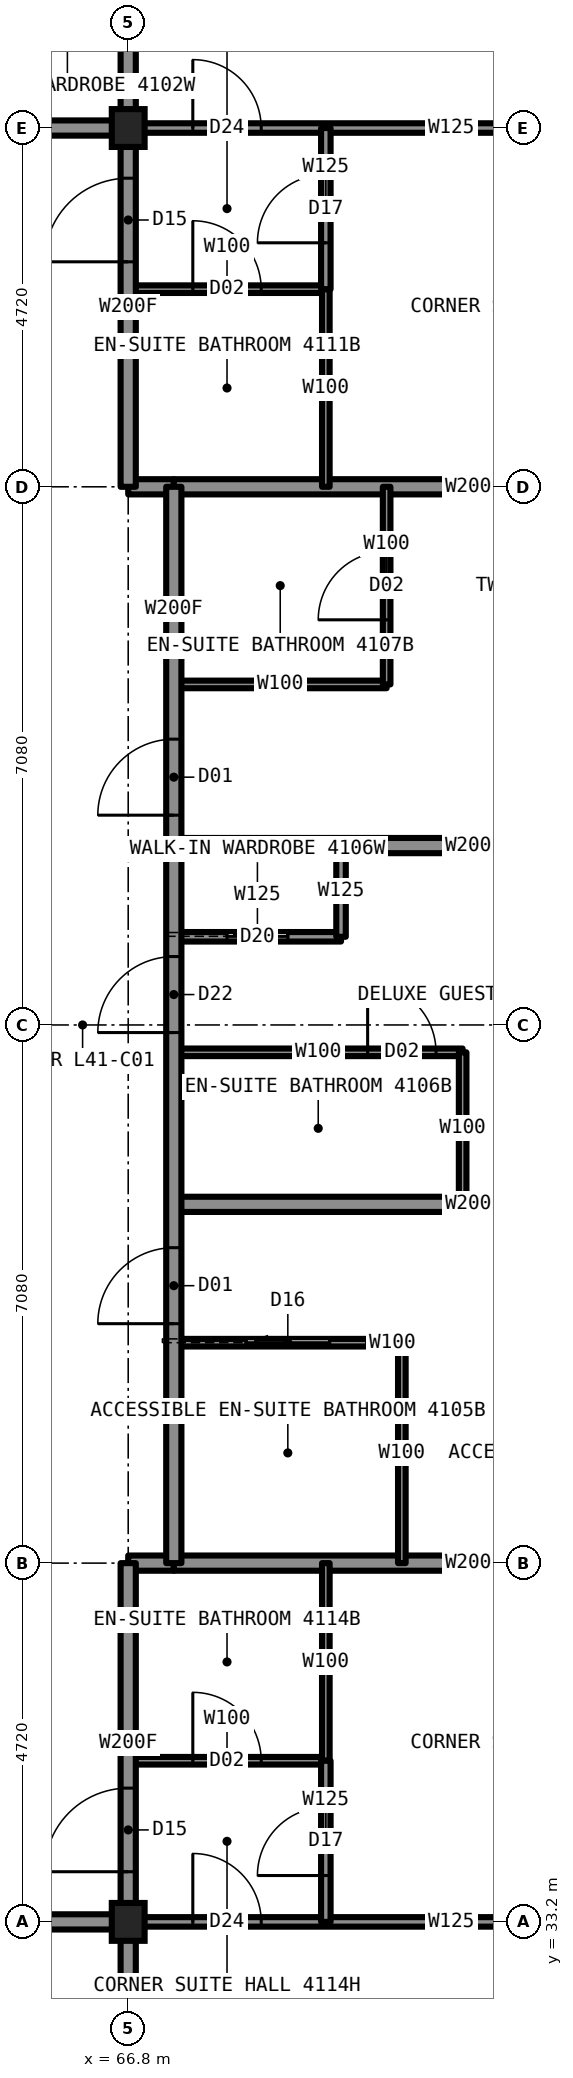
"""IFC4 building model, lengths in metres.
Left out: names, types, materials, properties, quantities, classifications, styles, units other than length and angle.
Written with IfcOpenShell. Run it as: python <this file> out.ifc"""

import sys

from ifc_helpers import new_model, si_unit, direction, frame, frame_2d, origin, origin_2d, place, context, subcontext, project, spatial, rectangle, i_section, extrude, element, fill, save


model = new_model("IFC4")
c1 = context("Model", 3, precision=1e-05, world=origin(), true_north=direction((0.0, 1.0)))
c2 = subcontext(c1, "Body", "Model", "MODEL_VIEW")
j1 = project(units=[si_unit("LENGTHUNIT", "METRE"), si_unit("PLANEANGLEUNIT", "RADIAN")], contexts=[c1])
p1 = place(None, origin())
s1 = spatial("IfcSite", under=j1, at=p1, CompositionType="ELEMENT")
p2 = place(p1, origin())
s2 = spatial("IfcBuilding", under=s1, at=p2, CompositionType="ELEMENT")
p3 = place(p2, frame((0.0, 0.0, 145.9)))
s3 = spatial("IfcBuildingStorey", under=s2, at=p3, CompositionType="ELEMENT", Elevation=145.9)
for number, where, z_axis, x_axis in (
    (1, (66.8, 33.2, 0.0), (0.0, 0.0, 1.0), (1.0, 0.0, 0.0)),
    (2, (66.8, 56.8, 0.0), (0.0, 0.0, 1.0), (1.0, 0.0, 0.0)),
):
    element("IfcColumn", number, at=place(p3, frame(where, z_axis=z_axis, x_axis=x_axis)), inside=s3, PredefinedType="COLUMN", context=c2, shape_type="SweptSolid", body=[
        extrude(i_section(OverallWidth=0.432, OverallDepth=0.498, WebThickness=0.056, FlangeThickness=0.089, at=origin_2d()), origin(), (0.0, 0.0, 1.0), 3.5),
    ])
p4 = place(p3, frame((66.8, 44.64, 0.0), z_axis=(0.0, 0.0, 1.0), x_axis=(1.0, 0.0, 0.0)))
e3 = element("IfcWall", 3, at=p4, inside=s3, PredefinedType="PARTITIONING", context=c2, shape_type="SweptSolid", body=[
    extrude(rectangle(XDim=3.8, YDim=0.1, at=frame_2d((1.9, 0.0))), origin(), (0.0, 0.0, 1.0), 3.33),
])
p5 = place(p4, frame((2.55, 0.0, 0.0)))
e4 = element("IfcOpeningElement", 4, at=p5, cuts=e3, PredefinedType="OPENING", context=c2, shape_type="SweptSolid", body=[
    extrude(rectangle(XDim=0.9, YDim=2.1, at=frame_2d((0.45, 1.05))), frame((0.0, 0.06, 0.0), z_axis=(0.0, -1.0, 0.0), x_axis=(1.0, 0.0, 0.0)), (0.0, 0.0, 1.0), 0.12),
])
p6 = place(p3, frame((43.2, 33.2, 0.0), z_axis=(0.0, 0.0, 1.0), x_axis=(1.0, 0.0, 0.0)))
e5 = element("IfcWall", 5, at=p6, inside=s3, PredefinedType="PARTITIONING", context=c2, shape_type="SweptSolid", body=[
    extrude(rectangle(XDim=23.6, YDim=0.2, at=frame_2d((11.8, 0.0))), origin(), (0.0, 0.0, 1.0), 3.33),
])
p7 = place(p6, frame((1.85, 0.0, 0.0)))
e6 = element("IfcOpeningElement", 6, at=p7, cuts=e5, PredefinedType="OPENING", context=c2, shape_type="SweptSolid", body=[
    extrude(rectangle(XDim=1.1, YDim=2.2, at=frame_2d((0.55, 1.1))), frame((0.0, 0.11, 0.0), z_axis=(0.0, -1.0, 0.0), x_axis=(1.0, 0.0, 0.0)), (0.0, 0.0, 1.0), 0.22),
])
p8 = place(p6, frame((17.16, 0.0, 0.0)))
e7 = element("IfcOpeningElement", 7, at=p8, cuts=e5, PredefinedType="OPENING", context=c2, shape_type="SweptSolid", body=[
    extrude(rectangle(XDim=1.0, YDim=2.2, at=frame_2d((0.5, 1.1))), frame((0.0, 0.11, 0.0), z_axis=(0.0, -1.0, 0.0), x_axis=(1.0, 0.0, 0.0)), (0.0, 0.0, 1.0), 0.22),
])
p9 = place(p3, frame((66.8, 33.2, 0.0), z_axis=(0.0, 0.0, 1.0), x_axis=(1.0, 0.0, 0.0)))
e8 = element("IfcWall", 8, at=p9, inside=s3, PredefinedType="PARTITIONING", context=c2, shape_type="SweptSolid", body=[
    extrude(rectangle(XDim=8.5, YDim=0.125, at=frame_2d((4.25, 0.0))), origin(), (0.0, 0.0, 1.0), 2.573),
])
p10 = place(p9, frame((0.85, 0.0, 0.0)))
e9 = element("IfcOpeningElement", 9, at=p10, cuts=e8, PredefinedType="OPENING", context=c2, shape_type="SweptSolid", body=[
    extrude(rectangle(XDim=0.9, YDim=2.2, at=frame_2d((0.45, 1.1))), frame((0.0, 0.073, 0.0), z_axis=(0.0, -1.0, 0.0), x_axis=(1.0, 0.0, 0.0)), (0.0, 0.0, 1.0), 0.145),
])
p11 = place(p3, frame((66.8, 42.64, 0.0), z_axis=(0.0, 0.0, 1.0), x_axis=(1.0, 0.0, 0.0)))
e10 = element("IfcWall", 10, at=p11, inside=s3, PredefinedType="PARTITIONING", context=c2, shape_type="SweptSolid", body=[
    extrude(rectangle(XDim=8.5, YDim=0.2, at=frame_2d((4.25, 0.0))), origin(), (0.0, 0.0, 1.0), 2.731),
])
p12 = place(p3, frame((66.8, 40.82, 0.0), z_axis=(0.0, 0.0, 1.0), x_axis=(1.0, 0.0, 0.0)))
e11 = element("IfcWall", 11, at=p12, inside=s3, PredefinedType="PARTITIONING", context=c2, shape_type="SweptSolid", body=[
    extrude(rectangle(XDim=3.0, YDim=0.1, at=frame_2d((1.5, 0.0))), origin(), (0.0, 0.0, 1.0), 3.33),
])
p13 = place(p12, frame((0.95, 0.0, 0.0)))
e12 = element("IfcOpeningElement", 12, at=p13, cuts=e11, PredefinedType="OPENING", context=c2, shape_type="SweptSolid", body=[
    extrude(rectangle(XDim=1.1, YDim=2.1, at=frame_2d((0.55, 1.05))), frame((0.0, 0.06, 0.0), z_axis=(0.0, -1.0, 0.0), x_axis=(1.0, 0.0, 0.0)), (0.0, 0.0, 1.0), 0.12),
])
p14 = place(p3, frame((66.8, 37.92, 0.0), z_axis=(0.0, 0.0, 1.0), x_axis=(1.0, 0.0, 0.0)))
e13 = element("IfcWall", 13, at=p14, inside=s3, PredefinedType="PARTITIONING", context=c2, shape_type="SweptSolid", body=[
    extrude(rectangle(XDim=8.5, YDim=0.2, at=frame_2d((4.25, 0.0))), origin(), (0.0, 0.0, 1.0), 2.573),
])
p15 = place(p3, frame((66.8, 35.32, 0.0), z_axis=(0.0, 0.0, 1.0), x_axis=(1.0, 0.0, 0.0)))
e14 = element("IfcWall", 14, at=p15, inside=s3, PredefinedType="PARTITIONING", context=c2, shape_type="SweptSolid", body=[
    extrude(rectangle(XDim=2.6, YDim=0.1, at=frame_2d((1.3, 0.0))), origin(), (0.0, 0.0, 1.0), 3.33),
])
p16 = place(p15, frame((0.85, 0.0, 0.0)))
e15 = element("IfcOpeningElement", 15, at=p16, cuts=e14, PredefinedType="OPENING", context=c2, shape_type="SweptSolid", body=[
    extrude(rectangle(XDim=0.9, YDim=2.1, at=frame_2d((0.45, 1.05))), frame((0.0, 0.06, 0.0), z_axis=(0.0, -1.0, 0.0), x_axis=(1.0, 0.0, 0.0)), (0.0, 0.0, 1.0), 0.12),
])
p17 = place(p3, frame((66.8, 46.16, 0.0), z_axis=(0.0, 0.0, 1.0), x_axis=(1.0, 0.0, 0.0)))
e16 = element("IfcWall", 16, at=p17, inside=s3, PredefinedType="PARTITIONING", context=c2, shape_type="SweptSolid", body=[
    extrude(rectangle(XDim=2.2, YDim=0.125, at=frame_2d((1.1, 0.0))), origin(), (0.0, 0.0, 1.0), 3.33),
])
p18 = place(p17, frame((0.7, 0.0, 0.0)))
e17 = element("IfcOpeningElement", 17, at=p18, cuts=e16, PredefinedType="OPENING", context=c2, shape_type="SweptSolid", body=[
    extrude(rectangle(XDim=0.8, YDim=2.1, at=frame_2d((0.4, 1.05))), frame((0.0, 0.073, 0.0), z_axis=(0.0, -1.0, 0.0), x_axis=(1.0, 0.0, 0.0)), (0.0, 0.0, 1.0), 0.145),
])
p19 = place(p3, frame((43.2, 56.8, 0.0), z_axis=(0.0, 0.0, 1.0), x_axis=(1.0, 0.0, 0.0)))
e18 = element("IfcWall", 18, at=p19, inside=s3, PredefinedType="PARTITIONING", context=c2, shape_type="SweptSolid", body=[
    extrude(rectangle(XDim=23.6, YDim=0.2, at=frame_2d((11.8, 0.0))), origin(), (0.0, 0.0, 1.0), 3.33),
])
p20 = place(p19, frame((1.85, 0.0, 0.0)))
e19 = element("IfcOpeningElement", 19, at=p20, cuts=e18, PredefinedType="OPENING", context=c2, shape_type="SweptSolid", body=[
    extrude(rectangle(XDim=1.1, YDim=2.2, at=frame_2d((0.55, 1.1))), frame((0.0, 0.11, 0.0), z_axis=(0.0, -1.0, 0.0), x_axis=(1.0, 0.0, 0.0)), (0.0, 0.0, 1.0), 0.22),
])
p21 = place(p19, frame((17.16, 0.0, 0.0)))
e20 = element("IfcOpeningElement", 20, at=p21, cuts=e18, PredefinedType="OPENING", context=c2, shape_type="SweptSolid", body=[
    extrude(rectangle(XDim=1.0, YDim=2.2, at=frame_2d((0.5, 1.1))), frame((0.0, 0.11, 0.0), z_axis=(0.0, -1.0, 0.0), x_axis=(1.0, 0.0, 0.0)), (0.0, 0.0, 1.0), 0.22),
])
p22 = place(p3, frame((66.8, 56.8, 0.0), z_axis=(0.0, 0.0, 1.0), x_axis=(1.0, 0.0, 0.0)))
e21 = element("IfcWall", 21, at=p22, inside=s3, PredefinedType="PARTITIONING", context=c2, shape_type="SweptSolid", body=[
    extrude(rectangle(XDim=8.5, YDim=0.125, at=frame_2d((4.25, 0.0))), origin(), (0.0, 0.0, 1.0), 2.573),
])
p23 = place(p22, frame((0.85, 0.0, 0.0)))
e22 = element("IfcOpeningElement", 22, at=p23, cuts=e21, PredefinedType="OPENING", context=c2, shape_type="SweptSolid", body=[
    extrude(rectangle(XDim=0.9, YDim=2.2, at=frame_2d((0.45, 1.1))), frame((0.0, 0.073, 0.0), z_axis=(0.0, -1.0, 0.0), x_axis=(1.0, 0.0, 0.0)), (0.0, 0.0, 1.0), 0.145),
])
p24 = place(p3, frame((66.8, 47.36, 0.0), z_axis=(0.0, 0.0, 1.0), x_axis=(1.0, 0.0, 0.0)))
e23 = element("IfcWall", 23, at=p24, inside=s3, PredefinedType="PARTITIONING", context=c2, shape_type="SweptSolid", body=[
    extrude(rectangle(XDim=8.5, YDim=0.2, at=frame_2d((4.25, 0.0))), origin(), (0.0, 0.0, 1.0), 2.731),
])
p25 = place(p3, frame((66.8, 49.48, 0.0), z_axis=(0.0, 0.0, 1.0), x_axis=(1.0, 0.0, 0.0)))
e24 = element("IfcWall", 24, at=p25, inside=s3, PredefinedType="PARTITIONING", context=c2, shape_type="SweptSolid", body=[
    extrude(rectangle(XDim=2.8, YDim=0.1, at=frame_2d((1.4, 0.0))), origin(), (0.0, 0.0, 1.0), 3.33),
])
p26 = place(p3, frame((66.8, 52.08, 0.0), z_axis=(0.0, 0.0, 1.0), x_axis=(1.0, 0.0, 0.0)))
e25 = element("IfcWall", 25, at=p26, inside=s3, PredefinedType="PARTITIONING", context=c2, shape_type="SweptSolid", body=[
    extrude(rectangle(XDim=2.6, YDim=0.2, at=frame_2d((1.3, 0.0))), origin(), (0.0, 0.0, 1.0), 2.573),
])
p27 = place(p3, frame((69.6, 52.08, 0.0), z_axis=(0.0, 0.0, 1.0), x_axis=(1.0, 0.0, 0.0)))
e26 = element("IfcWall", 26, at=p27, inside=s3, PredefinedType="PARTITIONING", context=c2, shape_type="SweptSolid", body=[
    extrude(rectangle(XDim=5.7, YDim=0.2, at=frame_2d((2.85, 0.0))), origin(), (0.0, 0.0, 1.0), 2.573),
])
p28 = place(p3, frame((66.8, 54.68, 0.0), z_axis=(0.0, 0.0, 1.0), x_axis=(1.0, 0.0, 0.0)))
e27 = element("IfcWall", 27, at=p28, inside=s3, PredefinedType="PARTITIONING", context=c2, shape_type="SweptSolid", body=[
    extrude(rectangle(XDim=2.6, YDim=0.1, at=frame_2d((1.3, 0.0))), origin(), (0.0, 0.0, 1.0), 3.33),
])
p29 = place(p28, frame((0.85, 0.0, 0.0)))
e28 = element("IfcOpeningElement", 28, at=p29, cuts=e27, PredefinedType="OPENING", context=c2, shape_type="SweptSolid", body=[
    extrude(rectangle(XDim=0.9, YDim=2.1, at=frame_2d((0.45, 1.05))), frame((0.0, 0.06, 0.0), z_axis=(0.0, -1.0, 0.0), x_axis=(1.0, 0.0, 0.0)), (0.0, 0.0, 1.0), 0.12),
])
p30 = place(p3, frame((66.8, 33.2, 0.0), z_axis=(0.0, 0.0, 1.0), x_axis=(0.0, 1.0, 0.0)))
e29 = element("IfcWall", 29, at=p30, inside=s3, PredefinedType="PARTITIONING", context=c2, shape_type="SweptSolid", body=[
    extrude(rectangle(XDim=23.6, YDim=0.2, at=frame_2d((11.8, 0.0))), origin(), (0.0, 0.0, 1.0), 3.33),
])
p31 = place(p30, frame((7.87, 0.0, 0.0)))
e30 = element("IfcOpeningElement", 30, at=p31, cuts=e29, PredefinedType="OPENING", context=c2, shape_type="SweptSolid", body=[
    extrude(rectangle(XDim=1.0, YDim=2.2, at=frame_2d((0.5, 1.1))), frame((0.0, 0.11, 0.0), z_axis=(0.0, -1.0, 0.0), x_axis=(1.0, 0.0, 0.0)), (0.0, 0.0, 1.0), 0.22),
])
p32 = place(p30, frame((11.7, 0.0, 0.0)))
e31 = element("IfcOpeningElement", 31, at=p32, cuts=e29, PredefinedType="OPENING", context=c2, shape_type="SweptSolid", body=[
    extrude(rectangle(XDim=1.0, YDim=2.2, at=frame_2d((0.5, 1.1))), frame((0.0, 0.11, 0.0), z_axis=(0.0, -1.0, 0.0), x_axis=(1.0, 0.0, 0.0)), (0.0, 0.0, 1.0), 0.22),
])
p33 = place(p30, frame((14.56, 0.0, 0.0)))
e32 = element("IfcOpeningElement", 32, at=p33, cuts=e29, PredefinedType="OPENING", context=c2, shape_type="SweptSolid", body=[
    extrude(rectangle(XDim=1.0, YDim=2.2, at=frame_2d((0.5, 1.1))), frame((0.0, 0.11, 0.0), z_axis=(0.0, -1.0, 0.0), x_axis=(1.0, 0.0, 0.0)), (0.0, 0.0, 1.0), 0.22),
])
p34 = place(p30, frame((21.84, 0.0, 0.0)))
e33 = element("IfcOpeningElement", 33, at=p34, cuts=e29, PredefinedType="OPENING", context=c2, shape_type="SweptSolid", body=[
    extrude(rectangle(XDim=1.1, YDim=2.2, at=frame_2d((0.55, 1.1))), frame((0.0, 0.11, 0.0), z_axis=(0.0, -1.0, 0.0), x_axis=(1.0, 0.0, 0.0)), (0.0, 0.0, 1.0), 0.22),
])
p35 = place(p30, frame((0.66, 0.0, 0.0)))
e34 = element("IfcOpeningElement", 34, at=p35, cuts=e29, PredefinedType="OPENING", context=c2, shape_type="SweptSolid", body=[
    extrude(rectangle(XDim=1.1, YDim=2.2, at=frame_2d((0.55, 1.1))), frame((0.0, 0.11, 0.0), z_axis=(0.0, -1.0, 0.0), x_axis=(1.0, 0.0, 0.0)), (0.0, 0.0, 1.0), 0.22),
])
for number, where, z_axis, x_axis in (
    (35, (66.8, 24.7, 0.0), (0.0, 0.0, 1.0), (0.0, 1.0, 0.0)),
    (36, (66.8, 56.8, 0.0), (0.0, 0.0, 1.0), (0.0, 1.0, 0.0)),
):
    element("IfcWall", number, at=place(p3, frame(where, z_axis=z_axis, x_axis=x_axis)), inside=s3, PredefinedType="PARTITIONING", context=c2, shape_type="SweptSolid", body=[
        extrude(rectangle(XDim=8.5, YDim=0.2, at=frame_2d((4.25, 0.0))), origin(), (0.0, 0.0, 1.0), 2.573),
    ])
p36 = place(p3, frame((69.0, 46.16, 0.0), z_axis=(0.0, 0.0, 1.0), x_axis=(0.0, 1.0, 0.0)))
e37 = element("IfcWall", 37, at=p36, inside=s3, PredefinedType="PARTITIONING", context=c2, shape_type="SweptSolid", body=[
    extrude(rectangle(XDim=1.2, YDim=0.125, at=frame_2d((0.6, 0.0))), origin(), (0.0, 0.0, 1.0), 3.33),
])
for number, where, z_axis, x_axis in (
    (38, (69.4, 35.32, 0.0), (0.0, 0.0, 1.0), (0.0, 1.0, 0.0)),
    (39, (69.4, 52.08, 0.0), (0.0, 0.0, 1.0), (0.0, 1.0, 0.0)),
):
    element("IfcWall", number, at=place(p3, frame(where, z_axis=z_axis, x_axis=x_axis)), inside=s3, PredefinedType="PARTITIONING", context=c2, shape_type="SweptSolid", body=[
        extrude(rectangle(XDim=2.6, YDim=0.1, at=frame_2d((1.3, 0.0))), origin(), (0.0, 0.0, 1.0), 3.33),
    ])
p37 = place(p3, frame((69.4, 33.2, 0.0), z_axis=(0.0, 0.0, 1.0), x_axis=(0.0, 1.0, 0.0)))
e40 = element("IfcWall", 40, at=p37, inside=s3, PredefinedType="PARTITIONING", context=c2, shape_type="SweptSolid", body=[
    extrude(rectangle(XDim=2.12, YDim=0.125, at=frame_2d((1.06, 0.0))), origin(), (0.0, 0.0, 1.0), 3.33),
])
p38 = place(p37, frame((0.61, 0.0, 0.0)))
e41 = element("IfcOpeningElement", 41, at=p38, cuts=e40, PredefinedType="OPENING", context=c2, shape_type="SweptSolid", body=[
    extrude(rectangle(XDim=0.9, YDim=2.2, at=frame_2d((0.45, 1.1))), frame((0.0, 0.073, 0.0), z_axis=(0.0, -1.0, 0.0), x_axis=(1.0, 0.0, 0.0)), (0.0, 0.0, 1.0), 0.145),
])
p39 = place(p3, frame((69.4, 54.68, 0.0), z_axis=(0.0, 0.0, 1.0), x_axis=(0.0, 1.0, 0.0)))
e42 = element("IfcWall", 42, at=p39, inside=s3, PredefinedType="PARTITIONING", context=c2, shape_type="SweptSolid", body=[
    extrude(rectangle(XDim=2.12, YDim=0.125, at=frame_2d((1.06, 0.0))), origin(), (0.0, 0.0, 1.0), 3.33),
])
p40 = place(p39, frame((0.61, 0.0, 0.0)))
e43 = element("IfcOpeningElement", 43, at=p40, cuts=e42, PredefinedType="OPENING", context=c2, shape_type="SweptSolid", body=[
    extrude(rectangle(XDim=0.9, YDim=2.2, at=frame_2d((0.45, 1.1))), frame((0.0, 0.073, 0.0), z_axis=(0.0, -1.0, 0.0), x_axis=(1.0, 0.0, 0.0)), (0.0, 0.0, 1.0), 0.145),
])
p41 = place(p3, frame((69.6, 49.48, 0.0), z_axis=(0.0, 0.0, 1.0), x_axis=(0.0, 1.0, 0.0)))
e44 = element("IfcWall", 44, at=p41, inside=s3, PredefinedType="PARTITIONING", context=c2, shape_type="SweptSolid", body=[
    extrude(rectangle(XDim=2.6, YDim=0.1, at=frame_2d((1.3, 0.0))), origin(), (0.0, 0.0, 1.0), 3.33),
])
p42 = place(p41, frame((0.85, 0.0, 0.0)))
e45 = element("IfcOpeningElement", 45, at=p42, cuts=e44, PredefinedType="OPENING", context=c2, shape_type="SweptSolid", body=[
    extrude(rectangle(XDim=0.9, YDim=2.1, at=frame_2d((0.45, 1.05))), frame((0.0, 0.06, 0.0), z_axis=(0.0, -1.0, 0.0), x_axis=(1.0, 0.0, 0.0)), (0.0, 0.0, 1.0), 0.12),
])
p43 = place(p3, frame((69.8, 37.92, 0.0), z_axis=(0.0, 0.0, 1.0), x_axis=(0.0, 1.0, 0.0)))
e46 = element("IfcWall", 46, at=p43, inside=s3, PredefinedType="PARTITIONING", context=c2, shape_type="SweptSolid", body=[
    extrude(rectangle(XDim=2.9, YDim=0.1, at=frame_2d((1.45, 0.0))), origin(), (0.0, 0.0, 1.0), 3.33),
])
p44 = place(p3, frame((70.6, 42.64, 0.0), z_axis=(0.0, 0.0, 1.0), x_axis=(0.0, 1.0, 0.0)))
e47 = element("IfcWall", 47, at=p44, inside=s3, PredefinedType="PARTITIONING", context=c2, shape_type="SweptSolid", body=[
    extrude(rectangle(XDim=2.0, YDim=0.1, at=frame_2d((1.0, 0.0))), origin(), (0.0, 0.0, 1.0), 3.33),
])
p45 = place(p31, origin())
e48 = element("IfcDoor", 48, at=p45, inside=s3, OperationType="SINGLE_SWING_LEFT", PredefinedType="DOOR", context=c2, shape_type="SweptSolid", body=[
    extrude(rectangle(XDim=1.0, YDim=2.2, at=frame_2d((0.5, 1.1))), frame((0.0, 0.025, 0.0), z_axis=(0.0, -1.0, 0.0), x_axis=(1.0, 0.0, 0.0)), (0.0, 0.0, 1.0), 0.05),
])
fill(e30, e48)
p46 = place(p13, origin())
e49 = element("IfcDoor", 49, at=p46, inside=s3, OperationType="SLIDING_TO_LEFT", PredefinedType="DOOR", context=c2, shape_type="SweptSolid", body=[
    extrude(rectangle(XDim=1.1, YDim=2.1, at=frame_2d((0.55, 1.05))), frame((0.0, 0.025, 0.0), z_axis=(0.0, -1.0, 0.0), x_axis=(1.0, 0.0, 0.0)), (0.0, 0.0, 1.0), 0.05),
])
fill(e12, e49)
p47 = place(p32, origin())
e50 = element("IfcDoor", 50, at=p47, inside=s3, OperationType="SINGLE_SWING_LEFT", PredefinedType="DOOR", context=c2, shape_type="SweptSolid", body=[
    extrude(rectangle(XDim=1.0, YDim=2.2, at=frame_2d((0.5, 1.1))), frame((0.0, 0.025, 0.0), z_axis=(0.0, -1.0, 0.0), x_axis=(1.0, 0.0, 0.0)), (0.0, 0.0, 1.0), 0.05),
])
fill(e31, e50)
p48 = place(p5, origin())
e51 = element("IfcDoor", 51, at=p48, inside=s3, OperationType="SINGLE_SWING_RIGHT", PredefinedType="DOOR", context=c2, shape_type="SweptSolid", body=[
    extrude(rectangle(XDim=0.9, YDim=2.1, at=frame_2d((0.45, 1.05))), frame((0.0, 0.025, 0.0), z_axis=(0.0, -1.0, 0.0), x_axis=(1.0, 0.0, 0.0)), (0.0, 0.0, 1.0), 0.05),
])
fill(e4, e51)
p49 = place(p18, origin())
e52 = element("IfcDoor", 52, at=p49, inside=s3, OperationType="SLIDING_TO_LEFT", PredefinedType="DOOR", context=c2, shape_type="SweptSolid", body=[
    extrude(rectangle(XDim=0.8, YDim=2.1, at=frame_2d((0.4, 1.05))), frame((0.0, 0.025, 0.0), z_axis=(0.0, -1.0, 0.0), x_axis=(1.0, 0.0, 0.0)), (0.0, 0.0, 1.0), 0.05),
])
fill(e17, e52)
p50 = place(p33, origin())
e53 = element("IfcDoor", 53, at=p50, inside=s3, OperationType="SINGLE_SWING_LEFT", PredefinedType="DOOR", context=c2, shape_type="SweptSolid", body=[
    extrude(rectangle(XDim=1.0, YDim=2.2, at=frame_2d((0.5, 1.1))), frame((0.0, 0.025, 0.0), z_axis=(0.0, -1.0, 0.0), x_axis=(1.0, 0.0, 0.0)), (0.0, 0.0, 1.0), 0.05),
])
fill(e32, e53)
p51 = place(p42, origin())
e54 = element("IfcDoor", 54, at=p51, inside=s3, OperationType="SINGLE_SWING_RIGHT", PredefinedType="DOOR", context=c2, shape_type="SweptSolid", body=[
    extrude(rectangle(XDim=0.9, YDim=2.1, at=frame_2d((0.45, 1.05))), frame((0.0, 0.025, 0.0), z_axis=(0.0, -1.0, 0.0), x_axis=(1.0, 0.0, 0.0)), (0.0, 0.0, 1.0), 0.05),
])
fill(e45, e54)
p52 = place(p23, origin())
e55 = element("IfcDoor", 55, at=p52, inside=s3, OperationType="SINGLE_SWING_LEFT", PredefinedType="DOOR", context=c2, shape_type="SweptSolid", body=[
    extrude(rectangle(XDim=0.9, YDim=2.2, at=frame_2d((0.45, 1.1))), frame((0.0, 0.025, 0.0), z_axis=(0.0, -1.0, 0.0), x_axis=(1.0, 0.0, 0.0)), (0.0, 0.0, 1.0), 0.05),
])
fill(e22, e55)
p53 = place(p29, origin())
e56 = element("IfcDoor", 56, at=p53, inside=s3, OperationType="SINGLE_SWING_RIGHT", PredefinedType="DOOR", context=c2, shape_type="SweptSolid", body=[
    extrude(rectangle(XDim=0.9, YDim=2.1, at=frame_2d((0.45, 1.05))), frame((0.0, 0.025, 0.0), z_axis=(0.0, -1.0, 0.0), x_axis=(1.0, 0.0, 0.0)), (0.0, 0.0, 1.0), 0.05),
])
fill(e28, e56)
p54 = place(p34, origin())
e57 = element("IfcDoor", 57, at=p54, inside=s3, OperationType="SINGLE_SWING_LEFT", PredefinedType="DOOR", context=c2, shape_type="SweptSolid", body=[
    extrude(rectangle(XDim=1.1, YDim=2.2, at=frame_2d((0.55, 1.1))), frame((0.0, 0.025, 0.0), z_axis=(0.0, -1.0, 0.0), x_axis=(1.0, 0.0, 0.0)), (0.0, 0.0, 1.0), 0.05),
])
fill(e33, e57)
p55 = place(p40, origin())
e58 = element("IfcDoor", 58, at=p55, inside=s3, OperationType="SINGLE_SWING_LEFT", PredefinedType="DOOR", context=c2, shape_type="SweptSolid", body=[
    extrude(rectangle(XDim=0.9, YDim=2.2, at=frame_2d((0.45, 1.1))), frame((0.0, 0.025, 0.0), z_axis=(0.0, -1.0, 0.0), x_axis=(1.0, 0.0, 0.0)), (0.0, 0.0, 1.0), 0.05),
])
fill(e43, e58)
p56 = place(p10, origin())
e59 = element("IfcDoor", 59, at=p56, inside=s3, OperationType="SINGLE_SWING_LEFT", PredefinedType="DOOR", context=c2, shape_type="SweptSolid", body=[
    extrude(rectangle(XDim=0.9, YDim=2.2, at=frame_2d((0.45, 1.1))), frame((0.0, 0.025, 0.0), z_axis=(0.0, -1.0, 0.0), x_axis=(1.0, 0.0, 0.0)), (0.0, 0.0, 1.0), 0.05),
])
fill(e9, e59)
p57 = place(p16, origin())
e60 = element("IfcDoor", 60, at=p57, inside=s3, OperationType="SINGLE_SWING_RIGHT", PredefinedType="DOOR", context=c2, shape_type="SweptSolid", body=[
    extrude(rectangle(XDim=0.9, YDim=2.1, at=frame_2d((0.45, 1.05))), frame((0.0, 0.025, 0.0), z_axis=(0.0, -1.0, 0.0), x_axis=(1.0, 0.0, 0.0)), (0.0, 0.0, 1.0), 0.05),
])
fill(e15, e60)
p58 = place(p35, origin())
e61 = element("IfcDoor", 61, at=p58, inside=s3, OperationType="SINGLE_SWING_LEFT", PredefinedType="DOOR", context=c2, shape_type="SweptSolid", body=[
    extrude(rectangle(XDim=1.1, YDim=2.2, at=frame_2d((0.55, 1.1))), frame((0.0, 0.025, 0.0), z_axis=(0.0, -1.0, 0.0), x_axis=(1.0, 0.0, 0.0)), (0.0, 0.0, 1.0), 0.05),
])
fill(e34, e61)
p59 = place(p38, origin())
e62 = element("IfcDoor", 62, at=p59, inside=s3, OperationType="SINGLE_SWING_LEFT", PredefinedType="DOOR", context=c2, shape_type="SweptSolid", body=[
    extrude(rectangle(XDim=0.9, YDim=2.2, at=frame_2d((0.45, 1.1))), frame((0.0, 0.025, 0.0), z_axis=(0.0, -1.0, 0.0), x_axis=(1.0, 0.0, 0.0)), (0.0, 0.0, 1.0), 0.05),
])
fill(e41, e62)
save(model, sys.argv[1])
